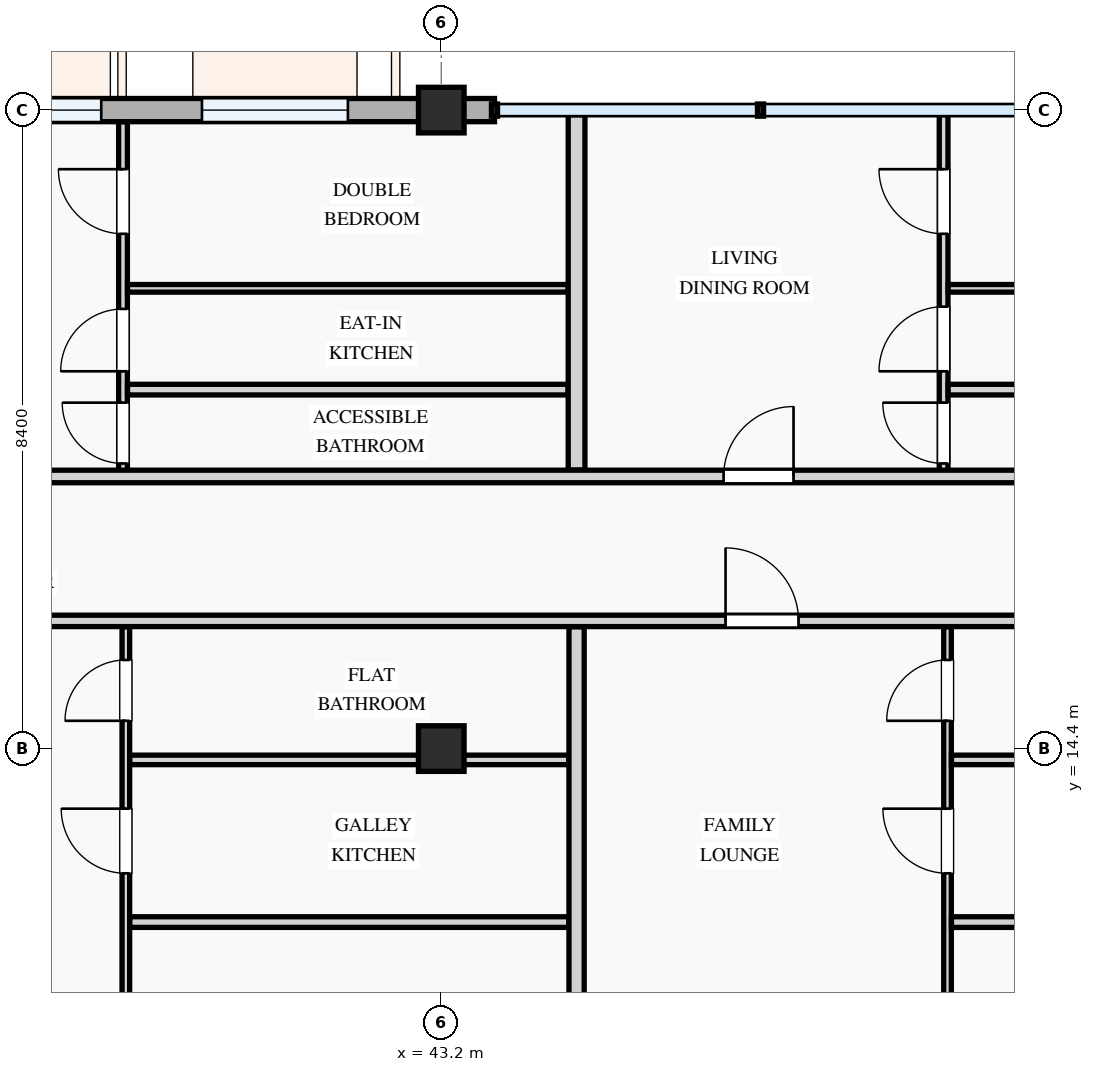
"""IFC4 building model, lengths in metres.
Left out: names, types, materials, properties, quantities, classifications, styles, units other than length and angle.
Written with IfcOpenShell. Run it as: python <this file> out.ifc"""

import sys

from ifc_helpers import new_model, si_unit, direction, frame, frame_2d, origin, origin_2d, place, context, subcontext, project, spatial, rectangle, extrude, element, fill, save


model = new_model("IFC4")
c1 = context("Model", 3, precision=1e-05, world=origin(), true_north=direction((0.0, 1.0)))
c2 = subcontext(c1, "Body", "Model", "MODEL_VIEW")
j1 = project(units=[si_unit("LENGTHUNIT", "METRE"), si_unit("PLANEANGLEUNIT", "RADIAN")], contexts=[c1])
p1 = place(None, origin())
s1 = spatial("IfcSite", under=j1, at=p1, CompositionType="ELEMENT")
p2 = place(p1, origin())
s2 = spatial("IfcBuilding", under=s1, at=p2, CompositionType="ELEMENT")
p3 = place(p2, frame((0.0, 0.0, 18.0)))
s3 = spatial("IfcBuildingStorey", under=s2, at=p3, CompositionType="ELEMENT", Elevation=18.0)
for number, where, z_axis, x_axis in (
    (1, (43.2, 14.4, 0.0), (0.0, 0.0, 1.0), (1.0, 0.0, 0.0)),
    (2, (43.2, 22.8, 0.0), (0.0, 0.0, 1.0), (1.0, 0.0, 0.0)),
):
    element("IfcColumn", number, at=place(p3, frame(where, z_axis=z_axis, x_axis=x_axis)), inside=s3, PredefinedType="COLUMN", context=c2, shape_type="SweptSolid", body=[
        extrude(rectangle(XDim=0.6, YDim=0.6, at=origin_2d()), origin(), (0.0, 0.0, 1.0), 3.3),
    ])
p4 = place(p3, frame((43.9, 22.8, 0.0), z_axis=(0.0, 0.0, 1.0), x_axis=(-1.0, 0.0, 0.0)))
e3 = element("IfcWall", 3, at=p4, inside=s3, PredefinedType="STANDARD", context=c2, shape_type="SweptSolid", body=[
    extrude(rectangle(XDim=0.7, YDim=0.305, at=frame_2d((0.35, 0.0))), origin(), (0.0, 0.0, 1.0), 2.375),
])
p5 = place(p3, frame((43.2, 22.8, 0.0), z_axis=(0.0, 0.0, 1.0), x_axis=(-1.0, 0.0, 0.0)))
e4 = element("IfcWall", 4, at=p5, inside=s3, PredefinedType="STANDARD", context=c2, shape_type="SweptSolid", body=[
    extrude(rectangle(XDim=6.0, YDim=0.305, at=frame_2d((3.0, 0.0))), origin(), (0.0, 0.0, 1.0), 2.475),
])
p6 = place(p5, frame((1.229, 0.0, 0.78)))
e5 = element("IfcOpeningElement", 5, at=p6, cuts=e4, PredefinedType="OPENING", context=c2, shape_type="SweptSolid", body=[
    extrude(rectangle(XDim=1.92, YDim=1.44, at=frame_2d((0.96, 0.72))), frame((0.0, 0.163, 0.0), z_axis=(0.0, -1.0, 0.0), x_axis=(1.0, 0.0, 0.0)), (0.0, 0.0, 1.0), 0.325),
])
p7 = place(p5, frame((4.474, 0.0, 0.78)))
e6 = element("IfcOpeningElement", 6, at=p7, cuts=e4, PredefinedType="OPENING", context=c2, shape_type="SweptSolid", body=[
    extrude(rectangle(XDim=1.05, YDim=1.2, at=frame_2d((0.525, 0.6))), frame((0.0, 0.163, 0.0), z_axis=(0.0, -1.0, 0.0), x_axis=(1.0, 0.0, 0.0)), (0.0, 0.0, 1.0), 0.325),
])
p8 = place(p3, frame((39.05, 8.554, 0.0), z_axis=(0.0, 0.0, 1.0), x_axis=(0.0, 1.0, 0.0)))
e7 = element("IfcWall", 7, at=p8, inside=s3, PredefinedType="PARTITIONING", context=c2, shape_type="SweptSolid", body=[
    extrude(rectangle(XDim=7.448, YDim=0.1, at=frame_2d((3.724, 0.0))), origin(), (0.0, 0.0, 1.0), 3.0),
])
p9 = place(p8, frame((1.309, 0.0, 0.0)))
e8 = element("IfcOpeningElement", 8, at=p9, cuts=e7, PredefinedType="OPENING", context=c2, shape_type="SweptSolid", body=[
    extrude(rectangle(XDim=0.82, YDim=2.08, at=frame_2d((0.41, 1.04))), frame((0.0, 0.06, 0.0), z_axis=(0.0, -1.0, 0.0), x_axis=(1.0, 0.0, 0.0)), (0.0, 0.0, 1.0), 0.12),
])
p10 = place(p8, frame((4.205, 0.0, 0.0)))
e9 = element("IfcOpeningElement", 9, at=p10, cuts=e7, PredefinedType="OPENING", context=c2, shape_type="SweptSolid", body=[
    extrude(rectangle(XDim=0.85, YDim=2.1, at=frame_2d((0.425, 1.05))), frame((0.0, 0.06, 0.0), z_axis=(0.0, -1.0, 0.0), x_axis=(1.0, 0.0, 0.0)), (0.0, 0.0, 1.0), 0.12),
])
p11 = place(p8, frame((6.211, 0.0, 0.0)))
e10 = element("IfcOpeningElement", 10, at=p11, cuts=e7, PredefinedType="OPENING", context=c2, shape_type="SweptSolid", body=[
    extrude(rectangle(XDim=0.8, YDim=2.1, at=frame_2d((0.4, 1.05))), frame((0.0, 0.06, 0.0), z_axis=(0.0, -1.0, 0.0), x_axis=(1.0, 0.0, 0.0)), (0.0, 0.0, 1.0), 0.12),
])
p12 = place(p3, frame((39.102, 12.118, 0.0), z_axis=(0.0, 0.0, 1.0), x_axis=(1.0, 0.0, 0.0)))
e11 = element("IfcWall", 11, at=p12, inside=s3, PredefinedType="PARTITIONING", context=c2, shape_type="SweptSolid", body=[
    extrude(rectangle(XDim=5.776, YDim=0.14, at=frame_2d((2.888, 0.0))), origin(), (0.0, 0.0, 1.0), 3.0),
])
p13 = place(p3, frame((39.102, 14.251, 0.0), z_axis=(0.0, 0.0, 1.0), x_axis=(1.0, 0.0, 0.0)))
e12 = element("IfcWall", 12, at=p13, inside=s3, PredefinedType="PARTITIONING", context=c2, shape_type="SweptSolid", body=[
    extrude(rectangle(XDim=5.776, YDim=0.125, at=frame_2d((2.888, 0.0))), origin(), (0.0, 0.0, 1.0), 2.375),
])
p14 = place(p3, frame((39.013, 17.98, 0.0), z_axis=(0.0, 0.0, 1.0), x_axis=(0.0, 1.0, 0.0)))
e13 = element("IfcWall", 13, at=p14, inside=s3, PredefinedType="PARTITIONING", context=c2, shape_type="SweptSolid", body=[
    extrude(rectangle(XDim=4.666, YDim=0.115, at=frame_2d((2.333, 0.0))), origin(), (0.0, 0.0, 1.0), 3.0),
])
p15 = place(p14, frame((0.171, 0.0, 0.0)))
e14 = element("IfcOpeningElement", 14, at=p15, cuts=e13, PredefinedType="OPENING", context=c2, shape_type="SweptSolid", body=[
    extrude(rectangle(XDim=0.8, YDim=2.1, at=frame_2d((0.4, 1.05))), frame((0.0, 0.067, 0.0), z_axis=(0.0, -1.0, 0.0), x_axis=(1.0, 0.0, 0.0)), (0.0, 0.0, 1.0), 0.135),
])
p16 = place(p14, frame((1.384, 0.0, 0.0)))
e15 = element("IfcOpeningElement", 15, at=p16, cuts=e13, PredefinedType="OPENING", context=c2, shape_type="SweptSolid", body=[
    extrude(rectangle(XDim=0.82, YDim=2.08, at=frame_2d((0.41, 1.04))), frame((0.0, 0.067, 0.0), z_axis=(0.0, -1.0, 0.0), x_axis=(1.0, 0.0, 0.0)), (0.0, 0.0, 1.0), 0.135),
])
p17 = place(p14, frame((3.193, 0.0, 0.0)))
e16 = element("IfcOpeningElement", 16, at=p17, cuts=e13, PredefinedType="OPENING", context=c2, shape_type="SweptSolid", body=[
    extrude(rectangle(XDim=0.85, YDim=2.1, at=frame_2d((0.425, 1.05))), frame((0.0, 0.067, 0.0), z_axis=(0.0, -1.0, 0.0), x_axis=(1.0, 0.0, 0.0)), (0.0, 0.0, 1.0), 0.135),
])
p18 = place(p3, frame((39.072, 20.455, 0.0), z_axis=(0.0, 0.0, 1.0), x_axis=(1.0, 0.0, 0.0)))
e17 = element("IfcWall", 17, at=p18, inside=s3, PredefinedType="PARTITIONING", context=c2, shape_type="SweptSolid", body=[
    extrude(rectangle(XDim=5.796, YDim=0.1, at=frame_2d((2.898, 0.0))), origin(), (0.0, 0.0, 1.0), 3.0),
])
p19 = place(p3, frame((39.072, 19.122, 0.0), z_axis=(0.0, 0.0, 1.0), x_axis=(1.0, 0.0, 0.0)))
e18 = element("IfcWall", 18, at=p19, inside=s3, PredefinedType="PARTITIONING", context=c2, shape_type="SweptSolid", body=[
    extrude(rectangle(XDim=5.796, YDim=0.14, at=frame_2d((2.898, 0.0))), origin(), (0.0, 0.0, 1.0), 3.0),
])
p20 = place(p3, frame((49.86, 8.554, 0.0), z_axis=(0.0, 0.0, 1.0), x_axis=(0.0, 1.0, 0.0)))
e19 = element("IfcWall", 19, at=p20, inside=s3, PredefinedType="PARTITIONING", context=c2, shape_type="SweptSolid", body=[
    extrude(rectangle(XDim=7.448, YDim=0.1, at=frame_2d((3.724, 0.0))), origin(), (0.0, 0.0, 1.0), 3.0),
])
p21 = place(p20, frame((1.309, 0.0, 0.0)))
e20 = element("IfcOpeningElement", 20, at=p21, cuts=e19, PredefinedType="OPENING", context=c2, shape_type="SweptSolid", body=[
    extrude(rectangle(XDim=0.85, YDim=2.1, at=frame_2d((0.425, 1.05))), frame((0.0, 0.06, 0.0), z_axis=(0.0, -1.0, 0.0), x_axis=(1.0, 0.0, 0.0)), (0.0, 0.0, 1.0), 0.12),
])
p22 = place(p20, frame((4.205, 0.0, 0.0)))
e21 = element("IfcOpeningElement", 21, at=p22, cuts=e19, PredefinedType="OPENING", context=c2, shape_type="SweptSolid", body=[
    extrude(rectangle(XDim=0.85, YDim=2.1, at=frame_2d((0.425, 1.05))), frame((0.0, 0.06, 0.0), z_axis=(0.0, -1.0, 0.0), x_axis=(1.0, 0.0, 0.0)), (0.0, 0.0, 1.0), 0.12),
])
p23 = place(p20, frame((6.211, 0.0, 0.0)))
e22 = element("IfcOpeningElement", 22, at=p23, cuts=e19, PredefinedType="OPENING", context=c2, shape_type="SweptSolid", body=[
    extrude(rectangle(XDim=0.8, YDim=2.1, at=frame_2d((0.4, 1.05))), frame((0.0, 0.06, 0.0), z_axis=(0.0, -1.0, 0.0), x_axis=(1.0, 0.0, 0.0)), (0.0, 0.0, 1.0), 0.12),
])
p24 = place(p3, frame((49.912, 12.118, 0.0), z_axis=(0.0, 0.0, 1.0), x_axis=(1.0, 0.0, 0.0)))
e23 = element("IfcWall", 23, at=p24, inside=s3, PredefinedType="PARTITIONING", context=c2, shape_type="SweptSolid", body=[
    extrude(rectangle(XDim=7.533, YDim=0.14, at=frame_2d((3.767, 0.0))), origin(), (0.0, 0.0, 1.0), 3.0),
])
p25 = place(p3, frame((49.912, 14.251, 0.0), z_axis=(0.0, 0.0, 1.0), x_axis=(1.0, 0.0, 0.0)))
e24 = element("IfcWall", 24, at=p25, inside=s3, PredefinedType="PARTITIONING", context=c2, shape_type="SweptSolid", body=[
    extrude(rectangle(XDim=7.533, YDim=0.125, at=frame_2d((3.767, 0.0))), origin(), (0.0, 0.0, 1.0), 2.375),
])
p26 = place(p3, frame((49.809, 17.98, 0.0), z_axis=(0.0, 0.0, 1.0), x_axis=(0.0, 1.0, 0.0)))
e25 = element("IfcWall", 25, at=p26, inside=s3, PredefinedType="PARTITIONING", context=c2, shape_type="SweptSolid", body=[
    extrude(rectangle(XDim=4.76, YDim=0.115, at=frame_2d((2.38, 0.0))), origin(), (0.0, 0.0, 1.0), 3.0),
])
p27 = place(p26, frame((0.171, 0.0, 0.0)))
e26 = element("IfcOpeningElement", 26, at=p27, cuts=e25, PredefinedType="OPENING", context=c2, shape_type="SweptSolid", body=[
    extrude(rectangle(XDim=0.8, YDim=2.1, at=frame_2d((0.4, 1.05))), frame((0.0, 0.067, 0.0), z_axis=(0.0, -1.0, 0.0), x_axis=(1.0, 0.0, 0.0)), (0.0, 0.0, 1.0), 0.135),
])
p28 = place(p26, frame((1.384, 0.0, 0.0)))
e27 = element("IfcOpeningElement", 27, at=p28, cuts=e25, PredefinedType="OPENING", context=c2, shape_type="SweptSolid", body=[
    extrude(rectangle(XDim=0.85, YDim=2.1, at=frame_2d((0.425, 1.05))), frame((0.0, 0.067, 0.0), z_axis=(0.0, -1.0, 0.0), x_axis=(1.0, 0.0, 0.0)), (0.0, 0.0, 1.0), 0.135),
])
p29 = place(p26, frame((3.193, 0.0, 0.0)))
e28 = element("IfcOpeningElement", 28, at=p29, cuts=e25, PredefinedType="OPENING", context=c2, shape_type="SweptSolid", body=[
    extrude(rectangle(XDim=0.85, YDim=2.1, at=frame_2d((0.425, 1.05))), frame((0.0, 0.067, 0.0), z_axis=(0.0, -1.0, 0.0), x_axis=(1.0, 0.0, 0.0)), (0.0, 0.0, 1.0), 0.135),
])
p30 = place(p3, frame((49.868, 20.455, 0.0), z_axis=(0.0, 0.0, 1.0), x_axis=(1.0, 0.0, 0.0)))
e29 = element("IfcWall", 29, at=p30, inside=s3, PredefinedType="PARTITIONING", context=c2, shape_type="SweptSolid", body=[
    extrude(rectangle(XDim=7.672, YDim=0.1, at=frame_2d((3.836, 0.0))), origin(), (0.0, 0.0, 1.0), 3.0),
])
p31 = place(p3, frame((49.868, 19.122, 0.0), z_axis=(0.0, 0.0, 1.0), x_axis=(1.0, 0.0, 0.0)))
e30 = element("IfcWall", 30, at=p31, inside=s3, PredefinedType="PARTITIONING", context=c2, shape_type="SweptSolid", body=[
    extrude(rectangle(XDim=7.672, YDim=0.14, at=frame_2d((3.836, 0.0))), origin(), (0.0, 0.0, 1.0), 3.0),
])
p32 = place(p3, frame((44.98, 8.554, 0.0), z_axis=(0.0, 0.0, 1.0), x_axis=(0.0, 1.0, 0.0)))
e31 = element("IfcWall", 31, at=p32, inside=s3, PredefinedType="PARTITIONING", context=c2, shape_type="SweptSolid", body=[
    extrude(rectangle(XDim=7.448, YDim=0.2, at=frame_2d((3.724, 0.0))), origin(), (0.0, 0.0, 1.0), 3.0),
])
p33 = place(p3, frame((44.98, 18.064, 0.0), z_axis=(0.0, 0.0, 1.0), x_axis=(0.0, 1.0, 0.0)))
e32 = element("IfcWall", 32, at=p33, inside=s3, PredefinedType="PARTITIONING", context=c2, shape_type="SweptSolid", body=[
    extrude(rectangle(XDim=4.676, YDim=0.22, at=frame_2d((2.338, 0.0))), origin(), (0.0, 0.0, 1.0), 3.0),
])
p34 = place(p3, frame((22.66, 16.08, 0.0), z_axis=(0.0, 0.0, 1.0), x_axis=(1.0, 0.0, 0.0)))
e33 = element("IfcWall", 33, at=p34, inside=s3, PredefinedType="PARTITIONING", context=c2, shape_type="SweptSolid", body=[
    extrude(rectangle(XDim=34.88, YDim=0.15, at=frame_2d((17.44, 0.0))), origin(), (0.0, 0.0, 1.0), 3.0),
])
p35 = place(p34, frame((2.672, 0.0, 0.0)))
e34 = element("IfcOpeningElement", 34, at=p35, cuts=e33, PredefinedType="OPENING", context=c2, shape_type="SweptSolid", body=[
    extrude(rectangle(XDim=0.92, YDim=2.1, at=frame_2d((0.46, 1.05))), frame((0.0, 0.085, 0.0), z_axis=(0.0, -1.0, 0.0), x_axis=(1.0, 0.0, 0.0)), (0.0, 0.0, 1.0), 0.17),
])
p36 = place(p34, frame((10.71, 0.0, 0.0)))
e35 = element("IfcOpeningElement", 35, at=p36, cuts=e33, PredefinedType="OPENING", context=c2, shape_type="SweptSolid", body=[
    extrude(rectangle(XDim=0.92, YDim=2.1, at=frame_2d((0.46, 1.05))), frame((0.0, 0.085, 0.0), z_axis=(0.0, -1.0, 0.0), x_axis=(1.0, 0.0, 0.0)), (0.0, 0.0, 1.0), 0.17),
])
p37 = place(p34, frame((24.28, 0.0, 0.0)))
e36 = element("IfcOpeningElement", 36, at=p37, cuts=e33, PredefinedType="OPENING", context=c2, shape_type="SweptSolid", body=[
    extrude(rectangle(XDim=0.96, YDim=2.12, at=frame_2d((0.48, 1.06))), frame((0.0, 0.085, 0.0), z_axis=(0.0, -1.0, 0.0), x_axis=(1.0, 0.0, 0.0)), (0.0, 0.0, 1.0), 0.17),
])
p38 = place(p3, frame((22.66, 17.98, 0.0), z_axis=(0.0, 0.0, 1.0), x_axis=(1.0, 0.0, 0.0)))
e37 = element("IfcWall", 37, at=p38, inside=s3, PredefinedType="PARTITIONING", context=c2, shape_type="SweptSolid", body=[
    extrude(rectangle(XDim=34.88, YDim=0.165, at=frame_2d((17.44, 0.0))), origin(), (0.0, 0.0, 1.0), 3.0),
])
p39 = place(p38, frame((2.664, 0.0, 0.0)))
e38 = element("IfcOpeningElement", 38, at=p39, cuts=e37, PredefinedType="OPENING", context=c2, shape_type="SweptSolid", body=[
    extrude(rectangle(XDim=0.92, YDim=2.1, at=frame_2d((0.46, 1.05))), frame((0.0, 0.093, 0.0), z_axis=(0.0, -1.0, 0.0), x_axis=(1.0, 0.0, 0.0)), (0.0, 0.0, 1.0), 0.185),
])
p40 = place(p38, frame((10.71, 0.0, 0.0)))
e39 = element("IfcOpeningElement", 39, at=p40, cuts=e37, PredefinedType="OPENING", context=c2, shape_type="SweptSolid", body=[
    extrude(rectangle(XDim=0.92, YDim=2.1, at=frame_2d((0.46, 1.05))), frame((0.0, 0.093, 0.0), z_axis=(0.0, -1.0, 0.0), x_axis=(1.0, 0.0, 0.0)), (0.0, 0.0, 1.0), 0.185),
])
p41 = place(p38, frame((24.254, 0.0, 0.0)))
e40 = element("IfcOpeningElement", 40, at=p41, cuts=e37, PredefinedType="OPENING", context=c2, shape_type="SweptSolid", body=[
    extrude(rectangle(XDim=0.92, YDim=2.1, at=frame_2d((0.46, 1.05))), frame((0.0, 0.093, 0.0), z_axis=(0.0, -1.0, 0.0), x_axis=(1.0, 0.0, 0.0)), (0.0, 0.0, 1.0), 0.185),
])
p42 = place(p6, origin())
e41 = element("IfcWindow", 41, at=p42, inside=s3, PartitioningType="DOUBLE_PANEL_VERTICAL", PredefinedType="WINDOW", context=c2, shape_type="SweptSolid", body=[
    extrude(rectangle(XDim=1.92, YDim=1.44, at=frame_2d((0.96, 0.72))), frame((0.0, 0.03, 0.0), z_axis=(0.0, -1.0, 0.0), x_axis=(1.0, 0.0, 0.0)), (0.0, 0.0, 1.0), 0.06),
])
fill(e5, e41)
p43 = place(p7, origin())
e42 = element("IfcWindow", 42, at=p43, inside=s3, PartitioningType="SINGLE_PANEL", PredefinedType="WINDOW", context=c2, shape_type="SweptSolid", body=[
    extrude(rectangle(XDim=1.05, YDim=1.2, at=frame_2d((0.525, 0.6))), frame((0.0, 0.03, 0.0), z_axis=(0.0, -1.0, 0.0), x_axis=(1.0, 0.0, 0.0)), (0.0, 0.0, 1.0), 0.06),
])
fill(e6, e42)
p44 = place(p10, origin())
e43 = element("IfcDoor", 43, at=p44, inside=s3, OperationType="SINGLE_SWING_RIGHT", PredefinedType="DOOR", context=c2, shape_type="SweptSolid", body=[
    extrude(rectangle(XDim=0.85, YDim=2.1, at=frame_2d((0.425, 1.05))), frame((0.0, 0.025, 0.0), z_axis=(0.0, -1.0, 0.0), x_axis=(1.0, 0.0, 0.0)), (0.0, 0.0, 1.0), 0.05),
])
fill(e9, e43)
p45 = place(p11, origin())
e44 = element("IfcDoor", 44, at=p45, inside=s3, OperationType="SINGLE_SWING_LEFT", PredefinedType="DOOR", context=c2, shape_type="SweptSolid", body=[
    extrude(rectangle(XDim=0.8, YDim=2.1, at=frame_2d((0.4, 1.05))), frame((0.0, 0.025, 0.0), z_axis=(0.0, -1.0, 0.0), x_axis=(1.0, 0.0, 0.0)), (0.0, 0.0, 1.0), 0.05),
])
fill(e10, e44)
p46 = place(p15, origin())
e45 = element("IfcDoor", 45, at=p46, inside=s3, OperationType="SINGLE_SWING_RIGHT", PredefinedType="DOOR", context=c2, shape_type="SweptSolid", body=[
    extrude(rectangle(XDim=0.8, YDim=2.1, at=frame_2d((0.4, 1.05))), frame((0.0, 0.025, 0.0), z_axis=(0.0, -1.0, 0.0), x_axis=(1.0, 0.0, 0.0)), (0.0, 0.0, 1.0), 0.05),
])
fill(e14, e45)
p47 = place(p16, origin())
e46 = element("IfcDoor", 46, at=p47, inside=s3, OperationType="SINGLE_SWING_LEFT", PredefinedType="DOOR", context=c2, shape_type="SweptSolid", body=[
    extrude(rectangle(XDim=0.82, YDim=2.08, at=frame_2d((0.41, 1.04))), frame((0.0, 0.025, 0.0), z_axis=(0.0, -1.0, 0.0), x_axis=(1.0, 0.0, 0.0)), (0.0, 0.0, 1.0), 0.05),
])
fill(e15, e46)
p48 = place(p17, origin())
e47 = element("IfcDoor", 47, at=p48, inside=s3, OperationType="SINGLE_SWING_RIGHT", PredefinedType="DOOR", context=c2, shape_type="SweptSolid", body=[
    extrude(rectangle(XDim=0.85, YDim=2.1, at=frame_2d((0.425, 1.05))), frame((0.0, 0.025, 0.0), z_axis=(0.0, -1.0, 0.0), x_axis=(1.0, 0.0, 0.0)), (0.0, 0.0, 1.0), 0.05),
])
fill(e16, e47)
p49 = place(p22, origin())
e48 = element("IfcDoor", 48, at=p49, inside=s3, OperationType="SINGLE_SWING_RIGHT", PredefinedType="DOOR", context=c2, shape_type="SweptSolid", body=[
    extrude(rectangle(XDim=0.85, YDim=2.1, at=frame_2d((0.425, 1.05))), frame((0.0, 0.025, 0.0), z_axis=(0.0, -1.0, 0.0), x_axis=(1.0, 0.0, 0.0)), (0.0, 0.0, 1.0), 0.05),
])
fill(e21, e48)
p50 = place(p23, origin())
e49 = element("IfcDoor", 49, at=p50, inside=s3, OperationType="SINGLE_SWING_LEFT", PredefinedType="DOOR", context=c2, shape_type="SweptSolid", body=[
    extrude(rectangle(XDim=0.8, YDim=2.1, at=frame_2d((0.4, 1.05))), frame((0.0, 0.025, 0.0), z_axis=(0.0, -1.0, 0.0), x_axis=(1.0, 0.0, 0.0)), (0.0, 0.0, 1.0), 0.05),
])
fill(e22, e49)
p51 = place(p27, origin())
e50 = element("IfcDoor", 50, at=p51, inside=s3, OperationType="SINGLE_SWING_RIGHT", PredefinedType="DOOR", context=c2, shape_type="SweptSolid", body=[
    extrude(rectangle(XDim=0.8, YDim=2.1, at=frame_2d((0.4, 1.05))), frame((0.0, 0.025, 0.0), z_axis=(0.0, -1.0, 0.0), x_axis=(1.0, 0.0, 0.0)), (0.0, 0.0, 1.0), 0.05),
])
fill(e26, e50)
p52 = place(p28, origin())
e51 = element("IfcDoor", 51, at=p52, inside=s3, OperationType="SINGLE_SWING_LEFT", PredefinedType="DOOR", context=c2, shape_type="SweptSolid", body=[
    extrude(rectangle(XDim=0.85, YDim=2.1, at=frame_2d((0.425, 1.05))), frame((0.0, 0.025, 0.0), z_axis=(0.0, -1.0, 0.0), x_axis=(1.0, 0.0, 0.0)), (0.0, 0.0, 1.0), 0.05),
])
fill(e27, e51)
p53 = place(p29, origin())
e52 = element("IfcDoor", 52, at=p53, inside=s3, OperationType="SINGLE_SWING_RIGHT", PredefinedType="DOOR", context=c2, shape_type="SweptSolid", body=[
    extrude(rectangle(XDim=0.85, YDim=2.1, at=frame_2d((0.425, 1.05))), frame((0.0, 0.025, 0.0), z_axis=(0.0, -1.0, 0.0), x_axis=(1.0, 0.0, 0.0)), (0.0, 0.0, 1.0), 0.05),
])
fill(e28, e52)
p54 = place(p37, origin())
e53 = element("IfcDoor", 53, at=p54, inside=s3, OperationType="SINGLE_SWING_LEFT", PredefinedType="DOOR", context=c2, shape_type="SweptSolid", body=[
    extrude(rectangle(XDim=0.96, YDim=2.12, at=frame_2d((0.48, 1.06))), frame((0.0, 0.025, 0.0), z_axis=(0.0, -1.0, 0.0), x_axis=(1.0, 0.0, 0.0)), (0.0, 0.0, 1.0), 0.05),
])
fill(e36, e53)
p55 = place(p41, origin())
e54 = element("IfcDoor", 54, at=p55, inside=s3, OperationType="SINGLE_SWING_RIGHT", PredefinedType="DOOR", context=c2, shape_type="SweptSolid", body=[
    extrude(rectangle(XDim=0.92, YDim=2.1, at=frame_2d((0.46, 1.05))), frame((0.0, 0.025, 0.0), z_axis=(0.0, -1.0, 0.0), x_axis=(1.0, 0.0, 0.0)), (0.0, 0.0, 1.0), 0.05),
])
fill(e40, e54)
save(model, sys.argv[1])
